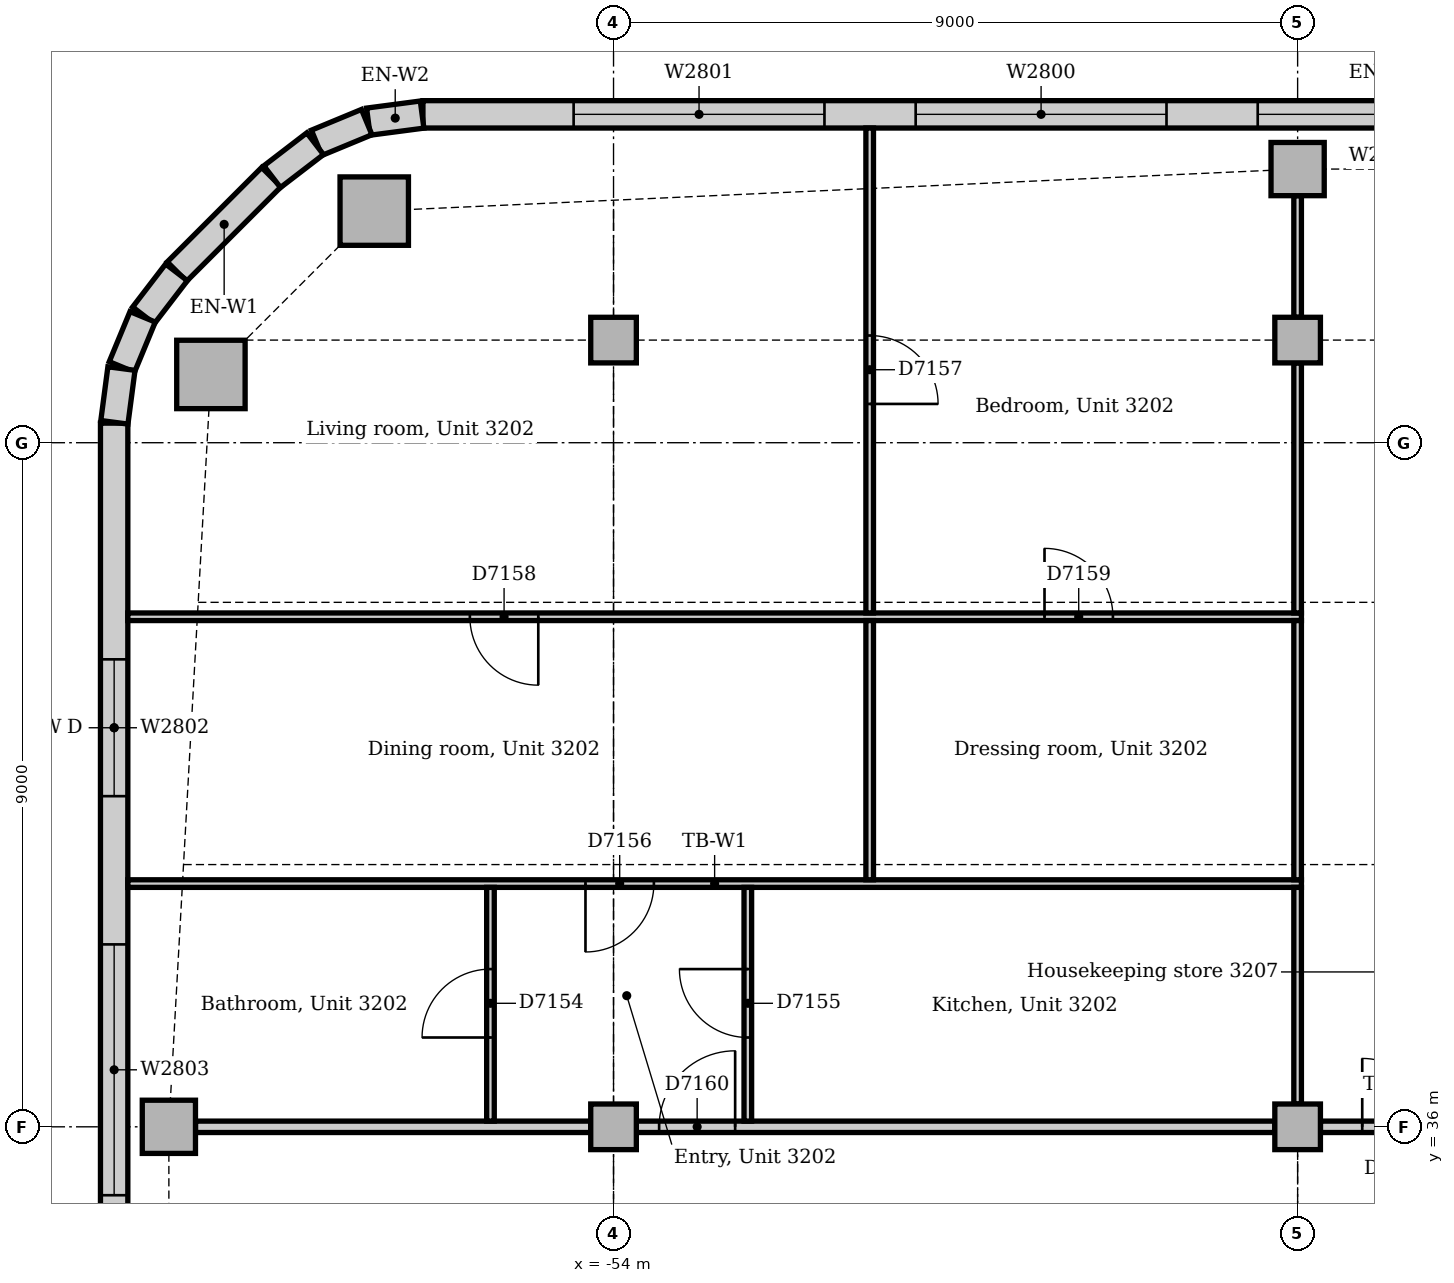
"""IFC4 building model, lengths in metres.
Left out: names, types, materials, properties, quantities, classifications, styles, units other than length and angle.
Written with IfcOpenShell. Run it as: python <this file> out.ifc"""

import sys

from ifc_helpers import new_model, si_unit, direction, frame, frame_2d, origin, origin_2d, place, context, subcontext, project, spatial, rectangle, extrude, element, fill, save


model = new_model("IFC4")
c1 = context("Model", 3, precision=1e-05, world=origin(), true_north=direction((0.0, 1.0)))
c2 = subcontext(c1, "Body", "Model", "MODEL_VIEW")
j1 = project(units=[si_unit("LENGTHUNIT", "METRE"), si_unit("PLANEANGLEUNIT", "RADIAN")], contexts=[c1])
p1 = place(None, origin())
s1 = spatial("IfcSite", under=j1, at=p1, CompositionType="ELEMENT")
p2 = place(p1, origin())
s2 = spatial("IfcBuilding", under=s1, at=p2, CompositionType="ELEMENT")
p3 = place(p2, frame((0.0, 0.0, 136.0)))
s3 = spatial("IfcBuildingStorey", under=s2, at=p3, CompositionType="ELEMENT", Elevation=136.0)
for number, where, z_axis, x_axis in (
    (1, (-57.148, 48.047, 0.0), (0.0, 0.0, 1.0), (1.0, 0.0, 0.0)),
    (2, (-59.297, 45.898, 0.0), (0.0, 0.0, 1.0), (1.0, 0.0, 0.0)),
):
    element("IfcColumn", number, at=place(p3, frame(where, z_axis=z_axis, x_axis=x_axis)), inside=s3, PredefinedType="COLUMN", context=c2, shape_type="SweptSolid", body=[
        extrude(rectangle(XDim=0.9, YDim=0.9, at=origin_2d()), origin(), (0.0, 0.0, 1.0), 3.85),
    ])
for number, where, z_axis, x_axis in (
    (3, (-45.0, 48.6, 0.0), (0.0, 0.0, 1.0), (1.0, 0.0, 0.0)),
    (4, (-59.85, 36.0, 0.0), (0.0, 0.0, 1.0), (1.0, 0.0, 0.0)),
):
    element("IfcColumn", number, at=place(p3, frame(where, z_axis=z_axis, x_axis=x_axis)), inside=s3, PredefinedType="COLUMN", context=c2, shape_type="SweptSolid", body=[
        extrude(rectangle(XDim=0.7, YDim=0.7, at=origin_2d()), origin(), (0.0, 0.0, 1.0), 3.85),
    ])
for number, where, z_axis, x_axis in (
    (5, (-54.0, 36.0, 0.0), (0.0, 0.0, 1.0), (1.0, 0.0, 0.0)),
    (6, (-54.0, 46.35, 0.0), (0.0, 0.0, 1.0), (1.0, 0.0, 0.0)),
    (7, (-45.0, 36.0, 0.0), (0.0, 0.0, 1.0), (1.0, 0.0, 0.0)),
    (8, (-45.0, 46.35, 0.0), (0.0, 0.0, 1.0), (1.0, 0.0, 0.0)),
):
    element("IfcColumn", number, at=place(p3, frame(where, z_axis=z_axis, x_axis=x_axis)), inside=s3, PredefinedType="COLUMN", context=c2, shape_type="SweptSolid", body=[
        extrude(rectangle(XDim=0.6, YDim=0.6, at=origin_2d()), origin(), (0.0, 0.0, 1.0), 3.85),
    ])
p4 = place(p3, frame((-31.243, 49.32, 0.0), z_axis=(0.0, 0.0, 1.0), x_axis=(-1.0, 0.0, 0.0)))
e9 = element("IfcWall", 9, at=p4, inside=s3, PredefinedType="STANDARD", context=c2, shape_type="SweptSolid", body=[
    extrude(rectangle(XDim=25.265, YDim=0.36, at=frame_2d((12.632, 0.0))), origin(), (0.0, 0.0, 1.0), 3.85),
])
p5 = place(p4, frame((1.982, 0.0, 0.9)))
e10 = element("IfcOpeningElement", 10, at=p5, cuts=e9, PredefinedType="OPENING", context=c2, shape_type="SweptSolid", body=[
    extrude(rectangle(XDim=3.3, YDim=1.6, at=frame_2d((1.65, 0.8))), frame((0.0, 0.19, 0.0), z_axis=(0.0, -1.0, 0.0), x_axis=(1.0, 0.0, 0.0)), (0.0, 0.0, 1.0), 0.38),
])
p6 = place(p4, frame((6.482, 0.0, 0.9)))
e11 = element("IfcOpeningElement", 11, at=p6, cuts=e9, PredefinedType="OPENING", context=c2, shape_type="SweptSolid", body=[
    extrude(rectangle(XDim=3.3, YDim=1.6, at=frame_2d((1.65, 0.8))), frame((0.0, 0.19, 0.0), z_axis=(0.0, -1.0, 0.0), x_axis=(1.0, 0.0, 0.0)), (0.0, 0.0, 1.0), 0.38),
])
p7 = place(p4, frame((10.982, 0.0, 0.9)))
e12 = element("IfcOpeningElement", 12, at=p7, cuts=e9, PredefinedType="OPENING", context=c2, shape_type="SweptSolid", body=[
    extrude(rectangle(XDim=3.3, YDim=1.6, at=frame_2d((1.65, 0.8))), frame((0.0, 0.19, 0.0), z_axis=(0.0, -1.0, 0.0), x_axis=(1.0, 0.0, 0.0)), (0.0, 0.0, 1.0), 0.38),
])
p8 = place(p4, frame((15.482, 0.0, 0.9)))
e13 = element("IfcOpeningElement", 13, at=p8, cuts=e9, PredefinedType="OPENING", context=c2, shape_type="SweptSolid", body=[
    extrude(rectangle(XDim=3.3, YDim=1.6, at=frame_2d((1.65, 0.8))), frame((0.0, 0.19, 0.0), z_axis=(0.0, -1.0, 0.0), x_axis=(1.0, 0.0, 0.0)), (0.0, 0.0, 1.0), 0.38),
])
p9 = place(p4, frame((19.982, 0.0, 0.9)))
e14 = element("IfcOpeningElement", 14, at=p9, cuts=e9, PredefinedType="OPENING", context=c2, shape_type="SweptSolid", body=[
    extrude(rectangle(XDim=3.3, YDim=1.6, at=frame_2d((1.65, 0.8))), frame((0.0, 0.19, 0.0), z_axis=(0.0, -1.0, 0.0), x_axis=(1.0, 0.0, 0.0)), (0.0, 0.0, 1.0), 0.38),
])
p10 = place(p3, frame((-58.501, 48.494, 0.0), z_axis=(0.0, 0.0, 1.0), x_axis=(-0.707106781187, -0.707106781187, 0.0)))
e15 = element("IfcWall", 15, at=p10, inside=s3, PredefinedType="STANDARD", context=c2, shape_type="SweptSolid", body=[
    extrude(rectangle(XDim=1.757, YDim=0.36, at=frame_2d((0.879, 0.0))), origin(), (0.0, 0.0, 1.0), 3.85),
])
p11 = place(p3, frame((-60.57, 45.257, 0.0), z_axis=(0.0, 0.0, 1.0), x_axis=(0.0, -1.0, 0.0)))
e16 = element("IfcWall", 16, at=p11, inside=s3, PredefinedType="STANDARD", context=c2, shape_type="SweptSolid", body=[
    extrude(rectangle(XDim=21.515, YDim=0.36, at=frame_2d((10.757, 0.0))), origin(), (0.0, 0.0, 1.0), 3.85),
])
p12 = place(p11, frame((3.107, 0.0, 0.9)))
e17 = element("IfcOpeningElement", 17, at=p12, cuts=e16, PredefinedType="OPENING", context=c2, shape_type="SweptSolid", body=[
    extrude(rectangle(XDim=1.8, YDim=1.6, at=frame_2d((0.9, 0.8))), frame((0.0, 0.19, 0.0), z_axis=(0.0, -1.0, 0.0), x_axis=(1.0, 0.0, 0.0)), (0.0, 0.0, 1.0), 0.38),
])
p13 = place(p11, frame((6.857, 0.0, 0.9)))
e18 = element("IfcOpeningElement", 18, at=p13, cuts=e16, PredefinedType="OPENING", context=c2, shape_type="SweptSolid", body=[
    extrude(rectangle(XDim=3.3, YDim=1.6, at=frame_2d((1.65, 0.8))), frame((0.0, 0.19, 0.0), z_axis=(0.0, -1.0, 0.0), x_axis=(1.0, 0.0, 0.0)), (0.0, 0.0, 1.0), 0.38),
])
p14 = place(p11, frame((11.357, 0.0, 0.9)))
e19 = element("IfcOpeningElement", 19, at=p14, cuts=e16, PredefinedType="OPENING", context=c2, shape_type="SweptSolid", body=[
    extrude(rectangle(XDim=3.3, YDim=1.6, at=frame_2d((1.65, 0.8))), frame((0.0, 0.19, 0.0), z_axis=(0.0, -1.0, 0.0), x_axis=(1.0, 0.0, 0.0)), (0.0, 0.0, 1.0), 0.38),
])
p15 = place(p11, frame((15.857, 0.0, 0.9)))
e20 = element("IfcOpeningElement", 20, at=p15, cuts=e16, PredefinedType="OPENING", context=c2, shape_type="SweptSolid", body=[
    extrude(rectangle(XDim=3.3, YDim=1.6, at=frame_2d((1.65, 0.8))), frame((0.0, 0.19, 0.0), z_axis=(0.0, -1.0, 0.0), x_axis=(1.0, 0.0, 0.0)), (0.0, 0.0, 1.0), 0.38),
])
for number, where, z_axis, x_axis in (
    (21, (-56.519, 49.317, 0.0), (0.0, 0.0, 1.0), (-0.991, -0.131, 0.0)),
    (22, (-57.247, 49.218, 0.0), (0.0, 0.0, 1.0), (-0.924, -0.383, 0.0)),
):
    element("IfcWall", number, at=place(p3, frame(where, z_axis=z_axis, x_axis=x_axis)), inside=s3, PredefinedType="STANDARD", context=c2, shape_type="SweptSolid", body=[
        extrude(rectangle(XDim=0.713, YDim=0.36, at=frame_2d((0.356, 0.0))), origin(), (0.0, 0.0, 1.0), 3.85),
    ])
for number, where, z_axis, x_axis in (
    (23, (-57.925, 48.934, 0.0), (0.0, 0.0, 1.0), (-0.793, -0.609, 0.0)),
    (24, (-59.75, 47.241, 0.0), (0.0, 0.0, 1.0), (-0.609, -0.793, 0.0)),
):
    element("IfcWall", number, at=place(p3, frame(where, z_axis=z_axis, x_axis=x_axis)), inside=s3, PredefinedType="STANDARD", context=c2, shape_type="SweptSolid", body=[
        extrude(rectangle(XDim=0.713, YDim=0.36, at=frame_2d((0.357, 0.0))), origin(), (0.0, 0.0, 1.0), 3.85),
    ])
for number, where, z_axis, x_axis in (
    (25, (-60.195, 46.656, 0.0), (0.0, 0.0, 1.0), (-0.383, -0.924, 0.0)),
    (26, (-60.474, 45.976, 0.0), (0.0, 0.0, 1.0), (-0.131, -0.991, 0.0)),
):
    element("IfcWall", number, at=place(p3, frame(where, z_axis=z_axis, x_axis=x_axis)), inside=s3, PredefinedType="STANDARD", context=c2, shape_type="SweptSolid", body=[
        extrude(rectangle(XDim=0.713, YDim=0.36, at=frame_2d((0.356, 0.0))), origin(), (0.0, 0.0, 1.0), 3.85),
    ])
p16 = place(p3, frame((-44.7, 36.0, 0.0), z_axis=(0.0, 0.0, 1.0), x_axis=(1.0, 0.0, 0.0)))
e27 = element("IfcWall", 27, at=p16, inside=s3, PredefinedType="PARTITIONING", context=c2, shape_type="SweptSolid", body=[
    extrude(rectangle(XDim=1.975, YDim=0.15, at=frame_2d((0.988, 0.0))), origin(), (0.0, 0.0, 1.0), 3.602),
])
p17 = place(p16, frame((0.55, 0.0, 0.0)))
e28 = element("IfcOpeningElement", 28, at=p17, cuts=e27, PredefinedType="OPENING", context=c2, shape_type="SweptSolid", body=[
    extrude(rectangle(XDim=0.9, YDim=2.1, at=frame_2d((0.45, 1.05))), frame((0.0, 0.085, 0.0), z_axis=(0.0, -1.0, 0.0), x_axis=(1.0, 0.0, 0.0)), (0.0, 0.0, 1.0), 0.17),
])
p18 = place(p3, frame((-53.7, 36.0, 0.0), z_axis=(0.0, 0.0, 1.0), x_axis=(1.0, 0.0, 0.0)))
e29 = element("IfcWall", 29, at=p18, inside=s3, PredefinedType="PARTITIONING", context=c2, shape_type="SweptSolid", body=[
    extrude(rectangle(XDim=8.4, YDim=0.15, at=frame_2d((4.2, 0.0))), origin(), (0.0, 0.0, 1.0), 3.262),
])
p19 = place(p18, frame((0.3, 0.0, 0.0)))
e30 = element("IfcOpeningElement", 30, at=p19, cuts=e29, PredefinedType="OPENING", context=c2, shape_type="SweptSolid", body=[
    extrude(rectangle(XDim=1.0, YDim=2.1, at=frame_2d((0.5, 1.05))), frame((0.0, 0.085, 0.0), z_axis=(0.0, -1.0, 0.0), x_axis=(1.0, 0.0, 0.0)), (0.0, 0.0, 1.0), 0.17),
])
p20 = place(p3, frame((-59.5, 36.0, 0.0), z_axis=(0.0, 0.0, 1.0), x_axis=(1.0, 0.0, 0.0)))
e31 = element("IfcWall", 31, at=p20, inside=s3, PredefinedType="PARTITIONING", context=c2, shape_type="SweptSolid", body=[
    extrude(rectangle(XDim=5.2, YDim=0.15, at=frame_2d((2.6, 0.0))), origin(), (0.0, 0.0, 1.0), 3.35),
])
p21 = place(p3, frame((-60.39, 39.2, 0.0), z_axis=(0.0, 0.0, 1.0), x_axis=(1.0, 0.0, 0.0)))
e32 = element("IfcWall", 32, at=p21, inside=s3, PredefinedType="PARTITIONING", context=c2, shape_type="SweptSolid", body=[
    extrude(rectangle(XDim=15.44, YDim=0.1, at=frame_2d((7.72, 0.0))), origin(), (0.0, 0.0, 1.0), 3.85),
])
p22 = place(p21, frame((6.021, 0.0, 0.0)))
e33 = element("IfcOpeningElement", 33, at=p22, cuts=e32, PredefinedType="OPENING", context=c2, shape_type="SweptSolid", body=[
    extrude(rectangle(XDim=0.9, YDim=2.1, at=frame_2d((0.45, 1.05))), frame((0.0, 0.06, 0.0), z_axis=(0.0, -1.0, 0.0), x_axis=(1.0, 0.0, 0.0)), (0.0, 0.0, 1.0), 0.12),
])
p23 = place(p3, frame((-60.39, 42.71, 0.0), z_axis=(0.0, 0.0, 1.0), x_axis=(1.0, 0.0, 0.0)))
e34 = element("IfcWall", 34, at=p23, inside=s3, PredefinedType="PARTITIONING", context=c2, shape_type="SweptSolid", body=[
    extrude(rectangle(XDim=15.44, YDim=0.1, at=frame_2d((7.72, 0.0))), origin(), (0.0, 0.0, 1.0), 3.85),
])
p24 = place(p23, frame((4.5, 0.0, 0.0)))
e35 = element("IfcOpeningElement", 35, at=p24, cuts=e34, PredefinedType="OPENING", context=c2, shape_type="SweptSolid", body=[
    extrude(rectangle(XDim=0.9, YDim=2.1, at=frame_2d((0.45, 1.05))), frame((0.0, 0.06, 0.0), z_axis=(0.0, -1.0, 0.0), x_axis=(1.0, 0.0, 0.0)), (0.0, 0.0, 1.0), 0.12),
])
p25 = place(p23, frame((12.06, 0.0, 0.0)))
e36 = element("IfcOpeningElement", 36, at=p25, cuts=e34, PredefinedType="OPENING", context=c2, shape_type="SweptSolid", body=[
    extrude(rectangle(XDim=0.9, YDim=2.1, at=frame_2d((0.45, 1.05))), frame((0.0, 0.06, 0.0), z_axis=(0.0, -1.0, 0.0), x_axis=(1.0, 0.0, 0.0)), (0.0, 0.0, 1.0), 0.12),
])
p26 = place(p3, frame((-45.0, 42.76, 0.0), z_axis=(0.0, 0.0, 1.0), x_axis=(0.0, 1.0, 0.0)))
e37 = element("IfcWall", 37, at=p26, inside=s3, PredefinedType="PARTITIONING", context=c2, shape_type="SweptSolid", body=[
    extrude(rectangle(XDim=3.29, YDim=0.1, at=frame_2d((1.645, 0.0))), origin(), (0.0, 0.0, 1.0), 3.362),
])
p27 = place(p3, frame((-45.0, 39.25, 0.0), z_axis=(0.0, 0.0, 1.0), x_axis=(0.0, 1.0, 0.0)))
e38 = element("IfcWall", 38, at=p27, inside=s3, PredefinedType="PARTITIONING", context=c2, shape_type="SweptSolid", body=[
    extrude(rectangle(XDim=3.41, YDim=0.1, at=frame_2d((1.705, 0.0))), origin(), (0.0, 0.0, 1.0), 3.362),
])
p28 = place(p3, frame((-45.0, 36.3, 0.0), z_axis=(0.0, 0.0, 1.0), x_axis=(0.0, 1.0, 0.0)))
e39 = element("IfcWall", 39, at=p28, inside=s3, PredefinedType="PARTITIONING", context=c2, shape_type="SweptSolid", body=[
    extrude(rectangle(XDim=2.85, YDim=0.1, at=frame_2d((1.425, 0.0))), origin(), (0.0, 0.0, 1.0), 3.362),
])
p29 = place(p3, frame((-45.0, 46.65, 0.0), z_axis=(0.0, 0.0, 1.0), x_axis=(0.0, 1.0, 0.0)))
e40 = element("IfcWall", 40, at=p29, inside=s3, PredefinedType="PARTITIONING", context=c2, shape_type="SweptSolid", body=[
    extrude(rectangle(XDim=1.6, YDim=0.1, at=frame_2d((0.8, 0.0))), origin(), (0.0, 0.0, 1.0), 3.652),
])
p30 = place(p3, frame((-50.63, 39.25, 0.0), z_axis=(0.0, 0.0, 1.0), x_axis=(0.0, 1.0, 0.0)))
e41 = element("IfcWall", 41, at=p30, inside=s3, PredefinedType="PARTITIONING", context=c2, shape_type="SweptSolid", body=[
    extrude(rectangle(XDim=3.41, YDim=0.1, at=frame_2d((1.705, 0.0))), origin(), (0.0, 0.0, 1.0), 3.85),
])
p31 = place(p3, frame((-50.63, 42.76, 0.0), z_axis=(0.0, 0.0, 1.0), x_axis=(0.0, 1.0, 0.0)))
e42 = element("IfcWall", 42, at=p31, inside=s3, PredefinedType="PARTITIONING", context=c2, shape_type="SweptSolid", body=[
    extrude(rectangle(XDim=6.38, YDim=0.1, at=frame_2d((3.19, 0.0))), origin(), (0.0, 0.0, 1.0), 3.85),
])
p32 = place(p31, frame((2.75, 0.0, 0.0)))
e43 = element("IfcOpeningElement", 43, at=p32, cuts=e42, PredefinedType="OPENING", context=c2, shape_type="SweptSolid", body=[
    extrude(rectangle(XDim=0.9, YDim=2.1, at=frame_2d((0.45, 1.05))), frame((0.0, 0.06, 0.0), z_axis=(0.0, -1.0, 0.0), x_axis=(1.0, 0.0, 0.0)), (0.0, 0.0, 1.0), 0.12),
])
p33 = place(p3, frame((-55.619, 36.075, 0.0), z_axis=(0.0, 0.0, 1.0), x_axis=(0.0, 1.0, 0.0)))
e44 = element("IfcWall", 44, at=p33, inside=s3, PredefinedType="PARTITIONING", context=c2, shape_type="SweptSolid", body=[
    extrude(rectangle(XDim=3.075, YDim=0.1, at=frame_2d((1.538, 0.0))), origin(), (0.0, 0.0, 1.0), 3.85),
])
p34 = place(p33, frame((1.1, 0.0, 0.0)))
e45 = element("IfcOpeningElement", 45, at=p34, cuts=e44, PredefinedType="OPENING", context=c2, shape_type="SweptSolid", body=[
    extrude(rectangle(XDim=0.9, YDim=2.1, at=frame_2d((0.45, 1.05))), frame((0.0, 0.06, 0.0), z_axis=(0.0, -1.0, 0.0), x_axis=(1.0, 0.0, 0.0)), (0.0, 0.0, 1.0), 0.12),
])
p35 = place(p3, frame((-52.233, 36.075, 0.0), z_axis=(0.0, 0.0, 1.0), x_axis=(0.0, 1.0, 0.0)))
e46 = element("IfcWall", 46, at=p35, inside=s3, PredefinedType="PARTITIONING", context=c2, shape_type="SweptSolid", body=[
    extrude(rectangle(XDim=3.075, YDim=0.1, at=frame_2d((1.538, 0.0))), origin(), (0.0, 0.0, 1.0), 3.85),
])
p36 = place(p35, frame((1.1, 0.0, 0.0)))
e47 = element("IfcOpeningElement", 47, at=p36, cuts=e46, PredefinedType="OPENING", context=c2, shape_type="SweptSolid", body=[
    extrude(rectangle(XDim=0.9, YDim=2.1, at=frame_2d((0.45, 1.05))), frame((0.0, 0.06, 0.0), z_axis=(0.0, -1.0, 0.0), x_axis=(1.0, 0.0, 0.0)), (0.0, 0.0, 1.0), 0.12),
])
p37 = place(p7, origin())
e48 = element("IfcWindow", 48, at=p37, inside=s3, PartitioningType="SINGLE_PANEL", PredefinedType="WINDOW", context=c2, shape_type="SweptSolid", body=[
    extrude(rectangle(XDim=3.3, YDim=1.6, at=frame_2d((1.65, 0.8))), frame((0.0, 0.13, 0.0), z_axis=(0.0, -1.0, 0.0), x_axis=(1.0, 0.0, 0.0)), (0.0, 0.0, 1.0), 0.06),
])
fill(e12, e48)
p38 = place(p8, origin())
e49 = element("IfcWindow", 49, at=p38, inside=s3, PartitioningType="SINGLE_PANEL", PredefinedType="WINDOW", context=c2, shape_type="SweptSolid", body=[
    extrude(rectangle(XDim=3.3, YDim=1.6, at=frame_2d((1.65, 0.8))), frame((0.0, 0.13, 0.0), z_axis=(0.0, -1.0, 0.0), x_axis=(1.0, 0.0, 0.0)), (0.0, 0.0, 1.0), 0.06),
])
fill(e13, e49)
p39 = place(p9, origin())
e50 = element("IfcWindow", 50, at=p39, inside=s3, PartitioningType="SINGLE_PANEL", PredefinedType="WINDOW", context=c2, shape_type="SweptSolid", body=[
    extrude(rectangle(XDim=3.3, YDim=1.6, at=frame_2d((1.65, 0.8))), frame((0.0, 0.13, 0.0), z_axis=(0.0, -1.0, 0.0), x_axis=(1.0, 0.0, 0.0)), (0.0, 0.0, 1.0), 0.06),
])
fill(e14, e50)
p40 = place(p12, origin())
e51 = element("IfcWindow", 51, at=p40, inside=s3, PartitioningType="SINGLE_PANEL", PredefinedType="WINDOW", context=c2, shape_type="SweptSolid", body=[
    extrude(rectangle(XDim=1.8, YDim=1.6, at=frame_2d((0.9, 0.8))), frame((0.0, 0.13, 0.0), z_axis=(0.0, -1.0, 0.0), x_axis=(1.0, 0.0, 0.0)), (0.0, 0.0, 1.0), 0.06),
])
fill(e17, e51)
p41 = place(p13, origin())
e52 = element("IfcWindow", 52, at=p41, inside=s3, PartitioningType="SINGLE_PANEL", PredefinedType="WINDOW", context=c2, shape_type="SweptSolid", body=[
    extrude(rectangle(XDim=3.3, YDim=1.6, at=frame_2d((1.65, 0.8))), frame((0.0, 0.13, 0.0), z_axis=(0.0, -1.0, 0.0), x_axis=(1.0, 0.0, 0.0)), (0.0, 0.0, 1.0), 0.06),
])
fill(e18, e52)
p42 = place(p17, origin())
e53 = element("IfcDoor", 53, at=p42, inside=s3, OperationType="SINGLE_SWING_LEFT", PredefinedType="DOOR", context=c2, shape_type="SweptSolid", body=[
    extrude(rectangle(XDim=0.9, YDim=2.1, at=frame_2d((0.45, 1.05))), frame((0.0, 0.025, 0.0), z_axis=(0.0, -1.0, 0.0), x_axis=(1.0, 0.0, 0.0)), (0.0, 0.0, 1.0), 0.05),
])
fill(e28, e53)
p43 = place(p34, origin())
e54 = element("IfcDoor", 54, at=p43, inside=s3, OperationType="SINGLE_SWING_LEFT", PredefinedType="DOOR", context=c2, shape_type="SweptSolid", body=[
    extrude(rectangle(XDim=0.9, YDim=2.1, at=frame_2d((0.45, 1.05))), frame((0.0, 0.025, 0.0), z_axis=(0.0, -1.0, 0.0), x_axis=(1.0, 0.0, 0.0)), (0.0, 0.0, 1.0), 0.05),
])
fill(e45, e54)
p44 = place(p36, origin())
e55 = element("IfcDoor", 55, at=p44, inside=s3, OperationType="SINGLE_SWING_RIGHT", PredefinedType="DOOR", context=c2, shape_type="SweptSolid", body=[
    extrude(rectangle(XDim=0.9, YDim=2.1, at=frame_2d((0.45, 1.05))), frame((0.0, 0.025, 0.0), z_axis=(0.0, -1.0, 0.0), x_axis=(1.0, 0.0, 0.0)), (0.0, 0.0, 1.0), 0.05),
])
fill(e47, e55)
p45 = place(p22, frame((0.9, 0.0, 0.0), z_axis=(0.0, 0.0, 1.0), x_axis=(-1.0, 0.0, 0.0)))
e56 = element("IfcDoor", 56, at=p45, inside=s3, OperationType="SINGLE_SWING_RIGHT", PredefinedType="DOOR", context=c2, shape_type="SweptSolid", body=[
    extrude(rectangle(XDim=0.9, YDim=2.1, at=frame_2d((0.45, 1.05))), frame((0.0, 0.025, 0.0), z_axis=(0.0, -1.0, 0.0), x_axis=(1.0, 0.0, 0.0)), (0.0, 0.0, 1.0), 0.05),
])
fill(e33, e56)
p46 = place(p32, frame((0.9, 0.0, 0.0), z_axis=(0.0, 0.0, 1.0), x_axis=(-1.0, 0.0, 0.0)))
e57 = element("IfcDoor", 57, at=p46, inside=s3, OperationType="SINGLE_SWING_RIGHT", PredefinedType="DOOR", context=c2, shape_type="SweptSolid", body=[
    extrude(rectangle(XDim=0.9, YDim=2.1, at=frame_2d((0.45, 1.05))), frame((0.0, 0.025, 0.0), z_axis=(0.0, -1.0, 0.0), x_axis=(1.0, 0.0, 0.0)), (0.0, 0.0, 1.0), 0.05),
])
fill(e43, e57)
p47 = place(p24, frame((0.9, 0.0, 0.0), z_axis=(0.0, 0.0, 1.0), x_axis=(-1.0, 0.0, 0.0)))
e58 = element("IfcDoor", 58, at=p47, inside=s3, OperationType="SINGLE_SWING_LEFT", PredefinedType="DOOR", context=c2, shape_type="SweptSolid", body=[
    extrude(rectangle(XDim=0.9, YDim=2.1, at=frame_2d((0.45, 1.05))), frame((0.0, 0.025, 0.0), z_axis=(0.0, -1.0, 0.0), x_axis=(1.0, 0.0, 0.0)), (0.0, 0.0, 1.0), 0.05),
])
fill(e35, e58)
p48 = place(p25, origin())
e59 = element("IfcDoor", 59, at=p48, inside=s3, OperationType="SINGLE_SWING_LEFT", PredefinedType="DOOR", context=c2, shape_type="SweptSolid", body=[
    extrude(rectangle(XDim=0.9, YDim=2.1, at=frame_2d((0.45, 1.05))), frame((0.0, 0.025, 0.0), z_axis=(0.0, -1.0, 0.0), x_axis=(1.0, 0.0, 0.0)), (0.0, 0.0, 1.0), 0.05),
])
fill(e36, e59)
p49 = place(p19, origin())
e60 = element("IfcDoor", 60, at=p49, inside=s3, OperationType="SINGLE_SWING_RIGHT", PredefinedType="DOOR", context=c2, shape_type="SweptSolid", body=[
    extrude(rectangle(XDim=1.0, YDim=2.1, at=frame_2d((0.5, 1.05))), frame((0.0, 0.025, 0.0), z_axis=(0.0, -1.0, 0.0), x_axis=(1.0, 0.0, 0.0)), (0.0, 0.0, 1.0), 0.05),
])
fill(e30, e60)
save(model, sys.argv[1])
